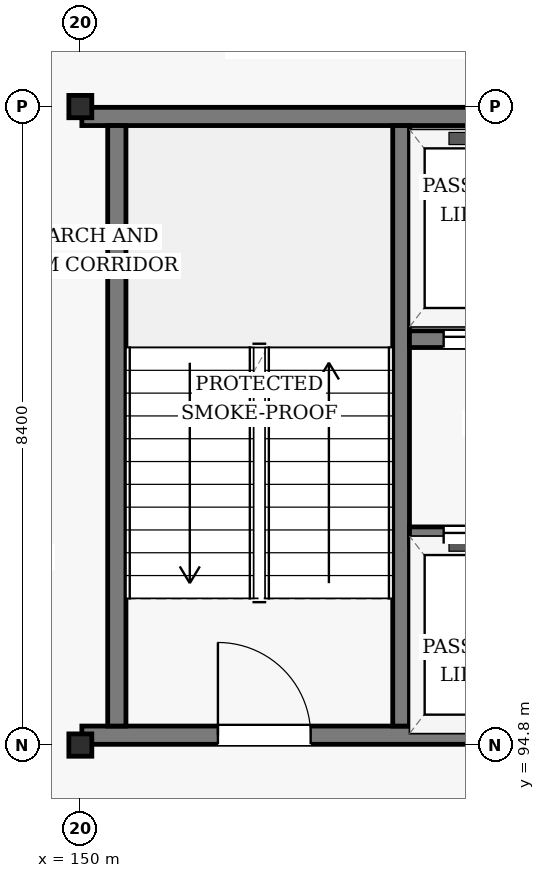
"""IFC4 building model, lengths in metres.
Left out: names, types, materials, properties, quantities, classifications, styles, units other than length and angle.
Written with IfcOpenShell. Run it as: python <this file> out.ifc"""

import sys

from ifc_helpers import new_model, si_unit, direction, frame, frame_2d, origin, origin_2d, place, context, subcontext, project, spatial, rectangle, i_section, extrude, element, fill, save


model = new_model("IFC4")
c1 = context("Model", 3, precision=1e-05, world=origin(), true_north=direction((0.0, 1.0)))
c2 = subcontext(c1, "Body", "Model", "MODEL_VIEW")
j1 = project(units=[si_unit("LENGTHUNIT", "METRE"), si_unit("PLANEANGLEUNIT", "RADIAN")], contexts=[c1])
p1 = place(None, origin())
s1 = spatial("IfcSite", under=j1, at=p1, CompositionType="ELEMENT")
p2 = place(p1, origin())
s2 = spatial("IfcBuilding", under=s1, at=p2, CompositionType="ELEMENT")
p3 = place(p2, frame((0.0, 0.0, 46.8)))
s3 = spatial("IfcBuildingStorey", under=s2, at=p3, CompositionType="ELEMENT", Elevation=46.8)
for number, where, z_axis, x_axis in (
    (1, (150.0, 94.8, 0.0), (0.0, 0.0, 1.0), (1.0, 0.0, 0.0)),
    (2, (150.0, 103.2, 0.0), (0.0, 0.0, 1.0), (1.0, 0.0, 0.0)),
):
    element("IfcColumn", number, at=place(p3, frame(where, z_axis=z_axis, x_axis=x_axis)), inside=s3, PredefinedType="COLUMN", context=c2, shape_type="SweptSolid", body=[
        extrude(i_section(OverallWidth=0.302, OverallDepth=0.294, WebThickness=0.012, FlangeThickness=0.012, FilletRadius=0.018, at=origin_2d()), origin(), (0.0, 0.0, 1.0), 3.6),
    ])
p4 = place(p3, frame((150.02, 94.93, 0.0), z_axis=(0.0, 0.0, 1.0), x_axis=(1.0, 0.0, 0.0)))
e3 = element("IfcWall", 3, at=p4, inside=s3, PredefinedType="SHEAR", context=c2, shape_type="SweptSolid", body=[
    extrude(rectangle(XDim=8.77, YDim=0.24, at=frame_2d((4.385, 0.0))), origin(), (0.0, 0.0, 1.0), 3.338),
])
p5 = place(p4, frame((1.79, 0.0, 0.0)))
e4 = element("IfcOpeningElement", 4, at=p5, cuts=e3, PredefinedType="OPENING", context=c2, shape_type="SweptSolid", body=[
    extrude(rectangle(XDim=1.22, YDim=2.18, at=frame_2d((0.61, 1.09))), frame((0.0, 0.13, 0.0), z_axis=(0.0, -1.0, 0.0), x_axis=(1.0, 0.0, 0.0)), (0.0, 0.0, 1.0), 0.26),
])
p6 = place(p3, frame((150.02, 103.07, 0.0), z_axis=(0.0, 0.0, 1.0), x_axis=(1.0, 0.0, 0.0)))
e5 = element("IfcWall", 5, at=p6, inside=s3, PredefinedType="SHEAR", context=c2, shape_type="SweptSolid", body=[
    extrude(rectangle(XDim=8.77, YDim=0.24, at=frame_2d((4.385, 0.0))), origin(), (0.0, 0.0, 1.0), 3.338),
])
p7 = place(p3, frame((150.48, 95.05, 0.0), z_axis=(0.0, 0.0, 1.0), x_axis=(0.0, 1.0, 0.0)))
e6 = element("IfcWall", 6, at=p7, inside=s3, PredefinedType="SHEAR", context=c2, shape_type="SweptSolid", body=[
    extrude(rectangle(XDim=7.9, YDim=0.24, at=frame_2d((3.95, 0.0))), origin(), (0.0, 0.0, 1.0), 3.338),
])
p8 = place(p3, frame((154.22, 95.05, 0.0), z_axis=(0.0, 0.0, 1.0), x_axis=(0.0, 1.0, 0.0)))
e7 = element("IfcWall", 7, at=p8, inside=s3, PredefinedType="SHEAR", context=c2, shape_type="SweptSolid", body=[
    extrude(rectangle(XDim=7.9, YDim=0.22, at=frame_2d((3.95, 0.0))), origin(), (0.0, 0.0, 1.0), 3.338),
])
p9 = place(p3, frame((154.33, 100.14, 0.0), z_axis=(0.0, 0.0, 1.0), x_axis=(1.0, 0.0, 0.0)))
e8 = element("IfcWall", 8, at=p9, inside=s3, PredefinedType="SHEAR", context=c2, shape_type="SweptSolid", body=[
    extrude(rectangle(XDim=2.0, YDim=0.22, at=frame_2d((1.0, 0.0))), origin(), (0.0, 0.0, 1.0), 3.338),
])
p10 = place(p9, frame((0.45, 0.0, 0.0)))
e9 = element("IfcOpeningElement", 9, at=p10, cuts=e8, PredefinedType="OPENING", context=c2, shape_type="SweptSolid", body=[
    extrude(rectangle(XDim=1.1, YDim=2.15, at=frame_2d((0.55, 1.075))), frame((0.0, 0.12, 0.0), z_axis=(0.0, -1.0, 0.0), x_axis=(1.0, 0.0, 0.0)), (0.0, 0.0, 1.0), 0.24),
])
p11 = place(p3, frame((154.33, 97.56, 0.0), z_axis=(0.0, 0.0, 1.0), x_axis=(1.0, 0.0, 0.0)))
e10 = element("IfcWall", 10, at=p11, inside=s3, PredefinedType="SHEAR", context=c2, shape_type="SweptSolid", body=[
    extrude(rectangle(XDim=2.0, YDim=0.22, at=frame_2d((1.0, 0.0))), origin(), (0.0, 0.0, 1.0), 3.338),
])
p12 = place(p11, frame((0.45, 0.0, 0.0)))
e11 = element("IfcOpeningElement", 11, at=p12, cuts=e10, PredefinedType="OPENING", context=c2, shape_type="SweptSolid", body=[
    extrude(rectangle(XDim=1.1, YDim=2.15, at=frame_2d((0.55, 1.075))), frame((0.0, 0.12, 0.0), z_axis=(0.0, -1.0, 0.0), x_axis=(1.0, 0.0, 0.0)), (0.0, 0.0, 1.0), 0.24),
])
p13 = place(p5, origin())
e12 = element("IfcDoor", 12, at=p13, inside=s3, OperationType="SINGLE_SWING_LEFT", PredefinedType="DOOR", context=c2, shape_type="SweptSolid", body=[
    extrude(rectangle(XDim=1.22, YDim=2.18, at=frame_2d((0.61, 1.09))), frame((0.0, 0.025, 0.0), z_axis=(0.0, -1.0, 0.0), x_axis=(1.0, 0.0, 0.0)), (0.0, 0.0, 1.0), 0.05),
])
fill(e4, e12)
p14 = place(p10, origin())
e13 = element("IfcDoor", 13, at=p14, inside=s3, OperationType="SLIDING_TO_LEFT", PredefinedType="DOOR", context=c2, shape_type="SweptSolid", body=[
    extrude(rectangle(XDim=1.1, YDim=2.15, at=frame_2d((0.55, 1.075))), frame((0.0, 0.025, 0.0), z_axis=(0.0, -1.0, 0.0), x_axis=(1.0, 0.0, 0.0)), (0.0, 0.0, 1.0), 0.05),
])
fill(e9, e13)
p15 = place(p12, origin())
e14 = element("IfcDoor", 14, at=p15, inside=s3, OperationType="SLIDING_TO_LEFT", PredefinedType="DOOR", context=c2, shape_type="SweptSolid", body=[
    extrude(rectangle(XDim=1.1, YDim=2.15, at=frame_2d((0.55, 1.075))), frame((0.0, 0.025, 0.0), z_axis=(0.0, -1.0, 0.0), x_axis=(1.0, 0.0, 0.0)), (0.0, 0.0, 1.0), 0.05),
])
fill(e11, e14)
save(model, sys.argv[1])
